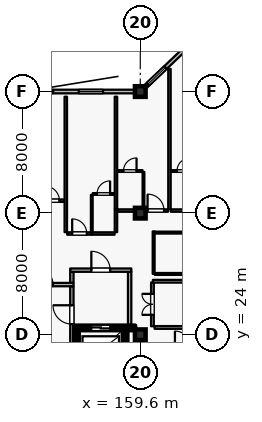
"""IFC4 building model, lengths in metres.
Left out: names, types, materials, properties, quantities, classifications, styles, units other than length and angle.
Written with IfcOpenShell. Run it as: python <this file> out.ifc"""

import sys

from ifc_helpers import new_model, si_unit, direction, frame, frame_2d, origin, origin_2d, place, context, subcontext, project, spatial, rectangle, extrude, element, fill, save


model = new_model("IFC4")
c1 = context("Model", 3, precision=1e-05, world=origin(), true_north=direction((0.0, 1.0)))
c2 = subcontext(c1, "Body", "Model", "MODEL_VIEW")
j1 = project(units=[si_unit("LENGTHUNIT", "METRE"), si_unit("PLANEANGLEUNIT", "RADIAN")], contexts=[c1])
p1 = place(None, origin())
s1 = spatial("IfcSite", under=j1, at=p1, CompositionType="ELEMENT")
p2 = place(p1, origin())
s2 = spatial("IfcBuilding", under=s1, at=p2, CompositionType="ELEMENT")
p3 = place(p2, frame((0.0, 0.0, 28.8)))
s3 = spatial("IfcBuildingStorey", under=s2, at=p3, CompositionType="ELEMENT", Elevation=28.8)
for number, where, z_axis, x_axis in (
    (1, (159.6, 24.0, 0.0), (0.0, 0.0, 1.0), (1.0, 0.0, 0.0)),
    (2, (159.6, 40.0, 0.0), (0.0, 0.0, 1.0), (1.0, 0.0, 0.0)),
    (3, (159.6, 32.0, 0.0), (0.0, 0.0, 1.0), (1.0, 0.0, 0.0)),
):
    element("IfcColumn", number, at=place(p3, frame(where, z_axis=z_axis, x_axis=x_axis)), inside=s3, PredefinedType="COLUMN", context=c2, shape_type="SweptSolid", body=[
        extrude(rectangle(XDim=0.7, YDim=0.7, at=origin_2d()), origin(), (0.0, 0.0, 1.0), 3.6),
    ])
p4 = place(p3, frame((151.55, 40.0, 0.0), z_axis=(0.0, 0.0, 1.0), x_axis=(1.0, 0.0, 0.0)))
e4 = element("IfcWall", 4, at=p4, inside=s3, PredefinedType="SOLIDWALL", context=c2, shape_type="SweptSolid", body=[
    extrude(rectangle(XDim=7.7, YDim=0.24, at=frame_2d((3.85, 0.0))), origin(), (0.0, 0.0, 1.0), 2.93),
])
p5 = place(p4, frame((0.725, 0.0, 0.8)))
e5 = element("IfcOpeningElement", 5, at=p5, cuts=e4, PredefinedType="OPENING", context=c2, shape_type="SweptSolid", body=[
    extrude(rectangle(XDim=1.6, YDim=1.6, at=frame_2d((0.8, 0.8))), frame((0.0, 0.13, 0.0), z_axis=(0.0, -1.0, 0.0), x_axis=(1.0, 0.0, 0.0)), (0.0, 0.0, 1.0), 0.26),
])
p6 = place(p4, frame((4.0, 0.0, 0.8)))
e6 = element("IfcOpeningElement", 6, at=p6, cuts=e4, PredefinedType="OPENING", context=c2, shape_type="SweptSolid", body=[
    extrude(rectangle(XDim=1.6, YDim=1.6, at=frame_2d((0.8, 0.8))), frame((0.0, 0.13, 0.0), z_axis=(0.0, -1.0, 0.0), x_axis=(1.0, 0.0, 0.0)), (0.0, 0.0, 1.0), 0.26),
])
p7 = place(p3, frame((159.95, 40.333, 0.0), z_axis=(0.0, 0.0, 1.0), x_axis=(0.724105170588, 0.689689569247, 0.0)))
e7 = element("IfcWall", 7, at=p7, inside=s3, PredefinedType="SOLIDWALL", context=c2, shape_type="SweptSolid", body=[
    extrude(rectangle(XDim=10.634, YDim=0.24, at=frame_2d((5.317, 0.0))), origin(), (0.0, 0.0, 1.0), 2.93),
])
p8 = place(p7, frame((0.215, 0.0, 0.8)))
e8 = element("IfcOpeningElement", 8, at=p8, cuts=e7, PredefinedType="OPENING", context=c2, shape_type="SweptSolid", body=[
    extrude(rectangle(XDim=1.6, YDim=1.6, at=frame_2d((0.8, 0.8))), frame((0.0, 0.13, 0.0), z_axis=(0.0, -1.0, 0.0), x_axis=(1.0, 0.0, 0.0)), (0.0, 0.0, 1.0), 0.26),
])
p9 = place(p7, frame((3.599, 0.0, 0.8)))
e9 = element("IfcOpeningElement", 9, at=p9, cuts=e7, PredefinedType="OPENING", context=c2, shape_type="SweptSolid", body=[
    extrude(rectangle(XDim=2.0, YDim=1.75, at=frame_2d((1.0, 0.875))), frame((0.0, 0.13, 0.0), z_axis=(0.0, -1.0, 0.0), x_axis=(1.0, 0.0, 0.0)), (0.0, 0.0, 1.0), 0.26),
])
p10 = place(p7, frame((7.901, 0.0, 0.8)))
e10 = element("IfcOpeningElement", 10, at=p10, cuts=e7, PredefinedType="OPENING", context=c2, shape_type="SweptSolid", body=[
    extrude(rectangle(XDim=2.0, YDim=1.75, at=frame_2d((1.0, 0.875))), frame((0.0, 0.13, 0.0), z_axis=(0.0, -1.0, 0.0), x_axis=(1.0, 0.0, 0.0)), (0.0, 0.0, 1.0), 0.26),
])
p11 = place(p3, frame((158.6, 21.705, 0.0), z_axis=(0.0, 0.0, 1.0), x_axis=(0.0, 1.0, 0.0)))
e11 = element("IfcWall", 11, at=p11, inside=s3, PredefinedType="SHEAR", context=c2, shape_type="SweptSolid", body=[
    extrude(rectangle(XDim=2.59, YDim=0.3, at=frame_2d((1.295, 0.0))), origin(), (0.0, 0.0, 1.0), 3.365),
])
p12 = place(p3, frame((159.26, 24.45, 0.0), z_axis=(0.0, 0.0, 1.0), x_axis=(-1.0, 0.0, 0.0)))
e12 = element("IfcWall", 12, at=p12, inside=s3, PredefinedType="SHEAR", context=c2, shape_type="SweptSolid", body=[
    extrude(rectangle(XDim=4.01, YDim=0.3, at=frame_2d((2.005, 0.0))), origin(), (0.0, 0.0, 1.0), 3.365),
])
p13 = place(p12, frame((1.635, 0.0, 0.0)))
e13 = element("IfcOpeningElement", 13, at=p13, cuts=e12, PredefinedType="OPENING", context=c2, shape_type="SweptSolid", body=[
    extrude(rectangle(XDim=1.25, YDim=2.25, at=frame_2d((0.625, 1.125))), frame((0.0, 0.16, 0.0), z_axis=(0.0, -1.0, 0.0), x_axis=(1.0, 0.0, 0.0)), (0.0, 0.0, 1.0), 0.32),
])
p14 = place(p3, frame((155.4, 24.295, 0.0), z_axis=(0.0, 0.0, 1.0), x_axis=(0.0, -1.0, 0.0)))
e14 = element("IfcWall", 14, at=p14, inside=s3, PredefinedType="SHEAR", context=c2, shape_type="SweptSolid", body=[
    extrude(rectangle(XDim=2.59, YDim=0.3, at=frame_2d((1.295, 0.0))), origin(), (0.0, 0.0, 1.0), 3.365),
])
p15 = place(p3, frame((151.39, 27.3, 0.0), z_axis=(0.0, 0.0, 1.0), x_axis=(1.0, 0.0, 0.0)))
e15 = element("IfcWall", 15, at=p15, inside=s3, PredefinedType="PARTITIONING", context=c2, shape_type="SweptSolid", body=[
    extrude(rectangle(XDim=3.82, YDim=0.22, at=frame_2d((1.91, 0.0))), origin(), (0.0, 0.0, 1.0), 3.365),
])
p16 = place(p15, frame((1.35, 0.0, 0.0)))
e16 = element("IfcOpeningElement", 16, at=p16, cuts=e15, PredefinedType="OPENING", context=c2, shape_type="SweptSolid", body=[
    extrude(rectangle(XDim=1.12, YDim=2.2, at=frame_2d((0.56, 1.1))), frame((0.0, 0.12, 0.0), z_axis=(0.0, -1.0, 0.0), x_axis=(1.0, 0.0, 0.0)), (0.0, 0.0, 1.0), 0.24),
])
p17 = place(p3, frame((155.1, 21.365, 0.0), z_axis=(0.0, 0.0, 1.0), x_axis=(0.0, 1.0, 0.0)))
e17 = element("IfcWall", 17, at=p17, inside=s3, PredefinedType="PARTITIONING", context=c2, shape_type="SweptSolid", body=[
    extrude(rectangle(XDim=5.82, YDim=0.22, at=frame_2d((2.91, 0.0))), origin(), (0.0, 0.0, 1.0), 3.365),
])
p18 = place(p17, frame((3.335, 0.0, 0.0)))
e18 = element("IfcOpeningElement", 18, at=p18, cuts=e17, PredefinedType="OPENING", context=c2, shape_type="SweptSolid", body=[
    extrude(rectangle(XDim=1.24, YDim=2.2, at=frame_2d((0.62, 1.1))), frame((0.0, 0.12, 0.0), z_axis=(0.0, -1.0, 0.0), x_axis=(1.0, 0.0, 0.0)), (0.0, 0.0, 1.0), 0.24),
])
p19 = place(p3, frame((155.1, 27.415, 0.0), z_axis=(0.0, 0.0, 1.0), x_axis=(0.0, 1.0, 0.0)))
e19 = element("IfcWall", 19, at=p19, inside=s3, PredefinedType="PARTITIONING", context=c2, shape_type="SweptSolid", body=[
    extrude(rectangle(XDim=0.72, YDim=0.22, at=frame_2d((0.36, 0.0))), origin(), (0.0, 0.0, 1.0), 3.365),
])
p20 = place(p3, frame((158.9, 24.605, 0.0), z_axis=(0.0, 0.0, 1.0), x_axis=(0.0, 1.0, 0.0)))
e20 = element("IfcWall", 20, at=p20, inside=s3, PredefinedType="PARTITIONING", context=c2, shape_type="SweptSolid", body=[
    extrude(rectangle(XDim=3.53, YDim=0.22, at=frame_2d((1.765, 0.0))), origin(), (0.0, 0.0, 1.0), 3.365),
])
p21 = place(p3, frame((154.99, 28.25, 0.0), z_axis=(0.0, 0.0, 1.0), x_axis=(1.0, 0.0, 0.0)))
e21 = element("IfcWall", 21, at=p21, inside=s3, PredefinedType="PARTITIONING", context=c2, shape_type="SweptSolid", body=[
    extrude(rectangle(XDim=4.02, YDim=0.22, at=frame_2d((2.01, 0.0))), origin(), (0.0, 0.0, 1.0), 3.365),
])
p22 = place(p21, frame((1.39, 0.0, 0.0)))
e22 = element("IfcOpeningElement", 22, at=p22, cuts=e21, PredefinedType="OPENING", context=c2, shape_type="SweptSolid", body=[
    extrude(rectangle(XDim=1.24, YDim=2.2, at=frame_2d((0.62, 1.1))), frame((0.0, 0.12, 0.0), z_axis=(0.0, -1.0, 0.0), x_axis=(1.0, 0.0, 0.0)), (0.0, 0.0, 1.0), 0.24),
])
p23 = place(p3, frame((152.99, 32.82, 0.0), z_axis=(0.0, 0.0, 1.0), x_axis=(1.0, 0.0, 0.0)))
e23 = element("IfcWall", 23, at=p23, inside=s3, PredefinedType="PARTITIONING", context=c2, shape_type="SweptSolid", body=[
    extrude(rectangle(XDim=1.62, YDim=0.16, at=frame_2d((0.81, 0.0))), origin(), (0.0, 0.0, 1.0), 3.365),
])
p24 = place(p23, frame((0.33, 0.0, 0.0)))
e24 = element("IfcOpeningElement", 24, at=p24, cuts=e23, PredefinedType="OPENING", context=c2, shape_type="SweptSolid", body=[
    extrude(rectangle(XDim=0.96, YDim=2.2, at=frame_2d((0.48, 1.1))), frame((0.0, 0.09, 0.0), z_axis=(0.0, -1.0, 0.0), x_axis=(1.0, 0.0, 0.0)), (0.0, 0.0, 1.0), 0.18),
])
p25 = place(p3, frame((154.79, 30.66, 0.0), z_axis=(0.0, 0.0, 1.0), x_axis=(1.0, 0.0, 0.0)))
e25 = element("IfcWall", 25, at=p25, inside=s3, PredefinedType="PARTITIONING", context=c2, shape_type="SweptSolid", body=[
    extrude(rectangle(XDim=1.62, YDim=0.16, at=frame_2d((0.81, 0.0))), origin(), (0.0, 0.0, 1.0), 3.365),
])
p26 = place(p25, frame((0.33, 0.0, 0.0)))
e26 = element("IfcOpeningElement", 26, at=p26, cuts=e25, PredefinedType="OPENING", context=c2, shape_type="SweptSolid", body=[
    extrude(rectangle(XDim=0.96, YDim=2.2, at=frame_2d((0.48, 1.1))), frame((0.0, 0.09, 0.0), z_axis=(0.0, -1.0, 0.0), x_axis=(1.0, 0.0, 0.0)), (0.0, 0.0, 1.0), 0.18),
])
p27 = place(p3, frame((156.42, 30.66, 0.0), z_axis=(0.0, 0.0, 1.0), x_axis=(1.0, 0.0, 0.0)))
e27 = element("IfcWall", 27, at=p27, inside=s3, PredefinedType="PARTITIONING", context=c2, shape_type="SweptSolid", body=[
    extrude(rectangle(XDim=1.49, YDim=0.16, at=frame_2d((0.745, 0.0))), origin(), (0.0, 0.0, 1.0), 3.365),
])
p28 = place(p3, frame((156.41, 30.75, 0.0), z_axis=(0.0, 0.0, 1.0), x_axis=(0.0, 1.0, 0.0)))
e28 = element("IfcWall", 28, at=p28, inside=s3, PredefinedType="PARTITIONING", context=c2, shape_type="SweptSolid", body=[
    extrude(rectangle(XDim=2.45, YDim=0.115, at=frame_2d((1.225, 0.0))), origin(), (0.0, 0.0, 1.0), 3.365),
])
p29 = place(p3, frame((156.47, 33.26, 0.0), z_axis=(0.0, 0.0, 1.0), x_axis=(1.0, 0.0, 0.0)))
e29 = element("IfcWall", 29, at=p29, inside=s3, PredefinedType="PARTITIONING", context=c2, shape_type="SweptSolid", body=[
    extrude(rectangle(XDim=1.43, YDim=0.115, at=frame_2d((0.715, 0.0))), origin(), (0.0, 0.0, 1.0), 3.365),
])
p30 = place(p29, frame((0.285, 0.0, 0.0)))
e30 = element("IfcOpeningElement", 30, at=p30, cuts=e29, PredefinedType="OPENING", context=c2, shape_type="SweptSolid", body=[
    extrude(rectangle(XDim=0.86, YDim=2.12, at=frame_2d((0.43, 1.06))), frame((0.0, 0.067, 0.0), z_axis=(0.0, -1.0, 0.0), x_axis=(1.0, 0.0, 0.0)), (0.0, 0.0, 1.0), 0.135),
])
p31 = place(p3, frame((154.7, 30.75, 0.0), z_axis=(0.0, 0.0, 1.0), x_axis=(0.0, 1.0, 0.0)))
e31 = element("IfcWall", 31, at=p31, inside=s3, PredefinedType="PARTITIONING", context=c2, shape_type="SweptSolid", body=[
    extrude(rectangle(XDim=8.91, YDim=0.16, at=frame_2d((4.455, 0.0))), origin(), (0.0, 0.0, 1.0), 3.365),
])
p32 = place(p3, frame((158.0, 30.75, 0.0), z_axis=(0.0, 0.0, 1.0), x_axis=(0.0, 1.0, 0.0)))
e32 = element("IfcWall", 32, at=p32, inside=s3, PredefinedType="PARTITIONING", context=c2, shape_type="SweptSolid", body=[
    extrude(rectangle(XDim=1.5, YDim=0.16, at=frame_2d((0.75, 0.0))), origin(), (0.0, 0.0, 1.0), 3.365),
])
p33 = place(p3, frame((158.09, 32.17, 0.0), z_axis=(0.0, 0.0, 1.0), x_axis=(1.0, 0.0, 0.0)))
e33 = element("IfcWall", 33, at=p33, inside=s3, PredefinedType="PARTITIONING", context=c2, shape_type="SweptSolid", body=[
    extrude(rectangle(XDim=1.71, YDim=0.16, at=frame_2d((0.855, 0.0))), origin(), (0.0, 0.0, 1.0), 3.365),
])
p34 = place(p3, frame((159.81, 32.17, 0.0), z_axis=(0.0, 0.0, 1.0), x_axis=(1.0, 0.0, 0.0)))
e34 = element("IfcWall", 34, at=p34, inside=s3, PredefinedType="PARTITIONING", context=c2, shape_type="SweptSolid", body=[
    extrude(rectangle(XDim=1.62, YDim=0.16, at=frame_2d((0.81, 0.0))), origin(), (0.0, 0.0, 1.0), 3.365),
])
p35 = place(p34, frame((0.27, 0.0, 0.0)))
e35 = element("IfcOpeningElement", 35, at=p35, cuts=e34, PredefinedType="OPENING", context=c2, shape_type="SweptSolid", body=[
    extrude(rectangle(XDim=1.08, YDim=2.3, at=frame_2d((0.54, 1.15))), frame((0.0, 0.09, 0.0), z_axis=(0.0, -1.0, 0.0), x_axis=(1.0, 0.0, 0.0)), (0.0, 0.0, 1.0), 0.18),
])
p36 = place(p3, frame((159.81, 32.26, 0.0), z_axis=(0.0, 0.0, 1.0), x_axis=(0.0, 1.0, 0.0)))
e36 = element("IfcWall", 36, at=p36, inside=s3, PredefinedType="PARTITIONING", context=c2, shape_type="SweptSolid", body=[
    extrude(rectangle(XDim=2.45, YDim=0.115, at=frame_2d((1.225, 0.0))), origin(), (0.0, 0.0, 1.0), 2.73),
])
p37 = place(p3, frame((158.1, 34.77, 0.0), z_axis=(0.0, 0.0, 1.0), x_axis=(1.0, 0.0, 0.0)))
e37 = element("IfcWall", 37, at=p37, inside=s3, PredefinedType="PARTITIONING", context=c2, shape_type="SweptSolid", body=[
    extrude(rectangle(XDim=1.65, YDim=0.115, at=frame_2d((0.825, 0.0))), origin(), (0.0, 0.0, 1.0), 3.365),
])
p38 = place(p37, frame((0.395, 0.0, 0.0)))
e38 = element("IfcOpeningElement", 38, at=p38, cuts=e37, PredefinedType="OPENING", context=c2, shape_type="SweptSolid", body=[
    extrude(rectangle(XDim=0.86, YDim=2.12, at=frame_2d((0.43, 1.06))), frame((0.0, 0.067, 0.0), z_axis=(0.0, -1.0, 0.0), x_axis=(1.0, 0.0, 0.0)), (0.0, 0.0, 1.0), 0.135),
])
p39 = place(p3, frame((158.0, 32.26, 0.0), z_axis=(0.0, 0.0, 1.0), x_axis=(0.0, 1.0, 0.0)))
e39 = element("IfcWall", 39, at=p39, inside=s3, PredefinedType="PARTITIONING", context=c2, shape_type="SweptSolid", body=[
    extrude(rectangle(XDim=7.4, YDim=0.16, at=frame_2d((3.7, 0.0))), origin(), (0.0, 0.0, 1.0), 3.365),
])
p40 = place(p3, frame((161.61, 32.17, 0.0), z_axis=(0.0, 0.0, 1.0), x_axis=(1.0, 0.0, 0.0)))
e40 = element("IfcWall", 40, at=p40, inside=s3, PredefinedType="PARTITIONING", context=c2, shape_type="SweptSolid", body=[
    extrude(rectangle(XDim=1.71, YDim=0.16, at=frame_2d((0.855, 0.0))), origin(), (0.0, 0.0, 1.0), 3.365),
])
p41 = place(p3, frame((161.62, 34.77, 0.0), z_axis=(0.0, 0.0, 1.0), x_axis=(1.0, 0.0, 0.0)))
e41 = element("IfcWall", 41, at=p41, inside=s3, PredefinedType="PARTITIONING", context=c2, shape_type="SweptSolid", body=[
    extrude(rectangle(XDim=1.65, YDim=0.115, at=frame_2d((0.825, 0.0))), origin(), (0.0, 0.0, 1.0), 3.365),
])
p42 = place(p41, frame((0.395, 0.0, 0.0)))
e42 = element("IfcOpeningElement", 42, at=p42, cuts=e41, PredefinedType="OPENING", context=c2, shape_type="SweptSolid", body=[
    extrude(rectangle(XDim=0.86, YDim=2.12, at=frame_2d((0.43, 1.06))), frame((0.0, 0.067, 0.0), z_axis=(0.0, -1.0, 0.0), x_axis=(1.0, 0.0, 0.0)), (0.0, 0.0, 1.0), 0.135),
])
p43 = place(p3, frame((161.52, 32.26, 0.0), z_axis=(0.0, 0.0, 1.0), x_axis=(0.0, 1.0, 0.0)))
e43 = element("IfcWall", 43, at=p43, inside=s3, PredefinedType="PARTITIONING", context=c2, shape_type="SweptSolid", body=[
    extrude(rectangle(XDim=9.23, YDim=0.16, at=frame_2d((4.615, 0.0))), origin(), (0.0, 0.0, 1.0), 3.365),
])
p44 = place(p3, frame((160.4, 24.56, 0.0), z_axis=(0.0, 0.0, 1.0), x_axis=(0.0, 1.0, 0.0)))
e44 = element("IfcWall", 44, at=p44, inside=s3, PredefinedType="PARTITIONING", context=c2, shape_type="SweptSolid", body=[
    extrude(rectangle(XDim=2.88, YDim=0.18, at=frame_2d((1.44, 0.0))), origin(), (0.0, 0.0, 1.0), 3.365),
])
p45 = place(p44, frame((0.75, 0.0, 0.0)))
e45 = element("IfcOpeningElement", 45, at=p45, cuts=e44, PredefinedType="OPENING", context=c2, shape_type="SweptSolid", body=[
    extrude(rectangle(XDim=1.38, YDim=2.3, at=frame_2d((0.69, 1.15))), frame((0.0, 0.1, 0.0), z_axis=(0.0, -1.0, 0.0), x_axis=(1.0, 0.0, 0.0)), (0.0, 0.0, 1.0), 0.2),
])
p46 = place(p3, frame((160.54, 24.48, 0.0), z_axis=(0.0, 0.0, 1.0), x_axis=(1.0, 0.0, 0.0)))
e46 = element("IfcWall", 46, at=p46, inside=s3, PredefinedType="PARTITIONING", context=c2, shape_type="SweptSolid", body=[
    extrude(rectangle(XDim=6.41, YDim=0.18, at=frame_2d((3.205, 0.0))), origin(), (0.0, 0.0, 1.0), 3.365),
])
p47 = place(p3, frame((160.56, 28.0, 0.0), z_axis=(0.0, 0.0, 1.0), x_axis=(1.0, 0.0, 0.0)))
e47 = element("IfcWall", 47, at=p47, inside=s3, PredefinedType="PARTITIONING", context=c2, shape_type="SweptSolid", body=[
    extrude(rectangle(XDim=6.48, YDim=0.125, at=frame_2d((3.24, 0.0))), origin(), (0.0, 0.0, 1.0), 3.365),
])
p48 = place(p47, frame((2.75, 0.0, 0.0)))
e48 = element("IfcOpeningElement", 48, at=p48, cuts=e47, PredefinedType="OPENING", context=c2, shape_type="SweptSolid", body=[
    extrude(rectangle(XDim=0.98, YDim=2.15, at=frame_2d((0.49, 1.075))), frame((0.0, 0.073, 0.0), z_axis=(0.0, -1.0, 0.0), x_axis=(1.0, 0.0, 0.0)), (0.0, 0.0, 1.0), 0.145),
])
p49 = place(p3, frame((160.432, 27.52, 0.0), z_axis=(0.0, 0.0, 1.0), x_axis=(1.0, 0.0, 0.0)))
e49 = element("IfcWall", 49, at=p49, inside=s3, PredefinedType="PARTITIONING", context=c2, shape_type="SweptSolid", body=[
    extrude(rectangle(XDim=6.598, YDim=0.18, at=frame_2d((3.299, 0.0))), origin(), (0.0, 0.0, 1.0), 3.365),
])
p50 = place(p3, frame((160.48, 28.004, 0.0), z_axis=(0.0, 0.0, 1.0), x_axis=(0.0, 1.0, 0.0)))
e50 = element("IfcWall", 50, at=p50, inside=s3, PredefinedType="PARTITIONING", context=c2, shape_type="SweptSolid", body=[
    extrude(rectangle(XDim=2.796, YDim=0.125, at=frame_2d((1.398, 0.0))), origin(), (0.0, 0.0, 1.0), 3.365),
])
p51 = place(p3, frame((160.543, 30.72, 0.0), z_axis=(0.0, 0.0, 1.0), x_axis=(1.0, 0.0, 0.0)))
e51 = element("IfcWall", 51, at=p51, inside=s3, PredefinedType="PARTITIONING", context=c2, shape_type="SweptSolid", body=[
    extrude(rectangle(XDim=6.514, YDim=0.125, at=frame_2d((3.257, 0.0))), origin(), (0.0, 0.0, 1.0), 3.365),
])
p52 = place(p5, origin())
e52 = element("IfcWindow", 52, at=p52, inside=s3, PartitioningType="SINGLE_PANEL", PredefinedType="WINDOW", context=c2, shape_type="SweptSolid", body=[
    extrude(rectangle(XDim=1.6, YDim=1.6, at=frame_2d((0.8, 0.8))), frame((0.0, 0.03, 0.0), z_axis=(0.0, -1.0, 0.0), x_axis=(1.0, 0.0, 0.0)), (0.0, 0.0, 1.0), 0.06),
])
fill(e5, e52)
p53 = place(p6, origin())
e53 = element("IfcWindow", 53, at=p53, inside=s3, PartitioningType="SINGLE_PANEL", PredefinedType="WINDOW", context=c2, shape_type="SweptSolid", body=[
    extrude(rectangle(XDim=1.6, YDim=1.6, at=frame_2d((0.8, 0.8))), frame((0.0, 0.03, 0.0), z_axis=(0.0, -1.0, 0.0), x_axis=(1.0, 0.0, 0.0)), (0.0, 0.0, 1.0), 0.06),
])
fill(e6, e53)
p54 = place(p8, origin())
e54 = element("IfcWindow", 54, at=p54, inside=s3, PartitioningType="SINGLE_PANEL", PredefinedType="WINDOW", context=c2, shape_type="SweptSolid", body=[
    extrude(rectangle(XDim=1.6, YDim=1.6, at=frame_2d((0.8, 0.8))), frame((0.0, 0.03, 0.0), z_axis=(0.0, -1.0, 0.0), x_axis=(1.0, 0.0, 0.0)), (0.0, 0.0, 1.0), 0.06),
])
fill(e8, e54)
p55 = place(p13, origin())
e55 = element("IfcDoor", 55, at=p55, inside=s3, OperationType="DOUBLE_DOOR_SLIDING", PredefinedType="DOOR", context=c2, shape_type="SweptSolid", body=[
    extrude(rectangle(XDim=1.25, YDim=2.25, at=frame_2d((0.625, 1.125))), frame((0.0, 0.025, 0.0), z_axis=(0.0, -1.0, 0.0), x_axis=(1.0, 0.0, 0.0)), (0.0, 0.0, 1.0), 0.05),
])
fill(e13, e55)
p56 = place(p16, origin())
e56 = element("IfcDoor", 56, at=p56, inside=s3, OperationType="SINGLE_SWING_LEFT", PredefinedType="DOOR", context=c2, shape_type="SweptSolid", body=[
    extrude(rectangle(XDim=1.12, YDim=2.2, at=frame_2d((0.56, 1.1))), frame((0.0, 0.025, 0.0), z_axis=(0.0, -1.0, 0.0), x_axis=(1.0, 0.0, 0.0)), (0.0, 0.0, 1.0), 0.05),
])
fill(e16, e56)
p57 = place(p18, origin())
e57 = element("IfcDoor", 57, at=p57, inside=s3, OperationType="SINGLE_SWING_RIGHT", PredefinedType="DOOR", context=c2, shape_type="SweptSolid", body=[
    extrude(rectangle(XDim=1.24, YDim=2.2, at=frame_2d((0.62, 1.1))), frame((0.0, 0.025, 0.0), z_axis=(0.0, -1.0, 0.0), x_axis=(1.0, 0.0, 0.0)), (0.0, 0.0, 1.0), 0.05),
])
fill(e18, e57)
p58 = place(p22, origin())
e58 = element("IfcDoor", 58, at=p58, inside=s3, OperationType="SINGLE_SWING_LEFT", PredefinedType="DOOR", context=c2, shape_type="SweptSolid", body=[
    extrude(rectangle(XDim=1.24, YDim=2.2, at=frame_2d((0.62, 1.1))), frame((0.0, 0.025, 0.0), z_axis=(0.0, -1.0, 0.0), x_axis=(1.0, 0.0, 0.0)), (0.0, 0.0, 1.0), 0.05),
])
fill(e22, e58)
p59 = place(p24, origin())
e59 = element("IfcDoor", 59, at=p59, inside=s3, OperationType="SINGLE_SWING_LEFT", PredefinedType="DOOR", context=c2, shape_type="SweptSolid", body=[
    extrude(rectangle(XDim=0.96, YDim=2.2, at=frame_2d((0.48, 1.1))), frame((0.0, 0.025, 0.0), z_axis=(0.0, -1.0, 0.0), x_axis=(1.0, 0.0, 0.0)), (0.0, 0.0, 1.0), 0.05),
])
fill(e24, e59)
p60 = place(p26, origin())
e60 = element("IfcDoor", 60, at=p60, inside=s3, OperationType="SINGLE_SWING_LEFT", PredefinedType="DOOR", context=c2, shape_type="SweptSolid", body=[
    extrude(rectangle(XDim=0.96, YDim=2.2, at=frame_2d((0.48, 1.1))), frame((0.0, 0.025, 0.0), z_axis=(0.0, -1.0, 0.0), x_axis=(1.0, 0.0, 0.0)), (0.0, 0.0, 1.0), 0.05),
])
fill(e26, e60)
p61 = place(p30, origin())
e61 = element("IfcDoor", 61, at=p61, inside=s3, OperationType="SINGLE_SWING_RIGHT", PredefinedType="DOOR", context=c2, shape_type="SweptSolid", body=[
    extrude(rectangle(XDim=0.86, YDim=2.12, at=frame_2d((0.43, 1.06))), frame((0.0, 0.025, 0.0), z_axis=(0.0, -1.0, 0.0), x_axis=(1.0, 0.0, 0.0)), (0.0, 0.0, 1.0), 0.05),
])
fill(e30, e61)
p62 = place(p35, origin())
e62 = element("IfcDoor", 62, at=p62, inside=s3, OperationType="SINGLE_SWING_LEFT", PredefinedType="DOOR", context=c2, shape_type="SweptSolid", body=[
    extrude(rectangle(XDim=1.08, YDim=2.3, at=frame_2d((0.54, 1.15))), frame((0.0, 0.025, 0.0), z_axis=(0.0, -1.0, 0.0), x_axis=(1.0, 0.0, 0.0)), (0.0, 0.0, 1.0), 0.05),
])
fill(e35, e62)
p63 = place(p38, origin())
e63 = element("IfcDoor", 63, at=p63, inside=s3, OperationType="SINGLE_SWING_RIGHT", PredefinedType="DOOR", context=c2, shape_type="SweptSolid", body=[
    extrude(rectangle(XDim=0.86, YDim=2.12, at=frame_2d((0.43, 1.06))), frame((0.0, 0.025, 0.0), z_axis=(0.0, -1.0, 0.0), x_axis=(1.0, 0.0, 0.0)), (0.0, 0.0, 1.0), 0.05),
])
fill(e38, e63)
p64 = place(p42, origin())
e64 = element("IfcDoor", 64, at=p64, inside=s3, OperationType="SINGLE_SWING_RIGHT", PredefinedType="DOOR", context=c2, shape_type="SweptSolid", body=[
    extrude(rectangle(XDim=0.86, YDim=2.12, at=frame_2d((0.43, 1.06))), frame((0.0, 0.025, 0.0), z_axis=(0.0, -1.0, 0.0), x_axis=(1.0, 0.0, 0.0)), (0.0, 0.0, 1.0), 0.05),
])
fill(e42, e64)
p65 = place(p45, origin())
e65 = element("IfcDoor", 65, at=p65, inside=s3, OperationType="DOUBLE_DOOR_SINGLE_SWING", PredefinedType="DOOR", context=c2, shape_type="SweptSolid", body=[
    extrude(rectangle(XDim=1.38, YDim=2.3, at=frame_2d((0.69, 1.15))), frame((0.0, 0.025, 0.0), z_axis=(0.0, -1.0, 0.0), x_axis=(1.0, 0.0, 0.0)), (0.0, 0.0, 1.0), 0.05),
])
fill(e45, e65)
save(model, sys.argv[1])
